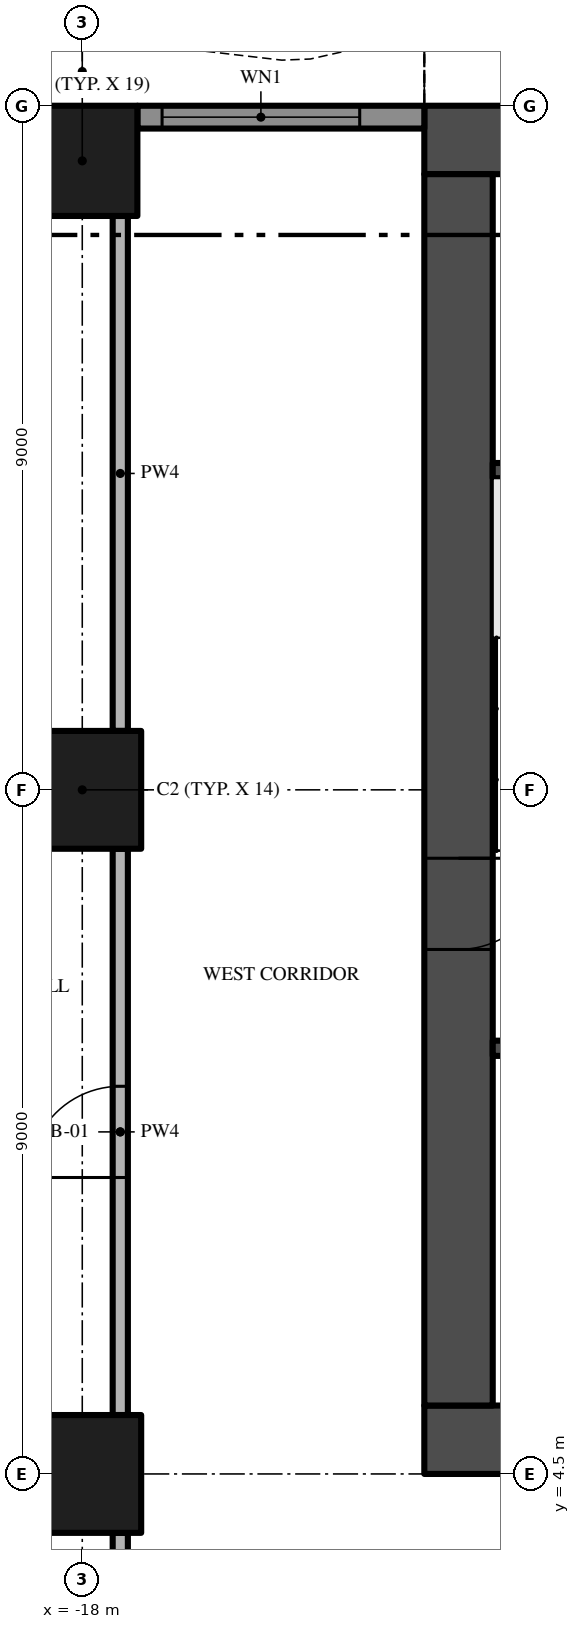
"""IFC4 building model, lengths in metres.
Left out: names, types, materials, properties, quantities, classifications, styles, units other than length and angle.
Written with IfcOpenShell. Run it as: python <this file> out.ifc"""

import sys

from ifc_helpers import new_model, si_unit, direction, frame, frame_2d, origin, origin_2d, place, context, subcontext, project, spatial, polyline, rectangle, outline, extrude, element, fill, save


model = new_model("IFC4")
c1 = context("Model", 3, precision=1e-05, world=origin(), true_north=direction((0.0, 1.0)))
c2 = subcontext(c1, "Body", "Model", "MODEL_VIEW")
j1 = project(units=[si_unit("LENGTHUNIT", "METRE"), si_unit("PLANEANGLEUNIT", "RADIAN")], contexts=[c1])
p1 = place(None, origin())
s1 = spatial("IfcSite", under=j1, at=p1, CompositionType="ELEMENT")
p2 = place(p1, origin())
s2 = spatial("IfcBuilding", under=s1, at=p2, CompositionType="ELEMENT")
p3 = place(p2, frame((0.0, 0.0, 34.0)))
s3 = spatial("IfcBuildingStorey", under=s2, at=p3, CompositionType="ELEMENT", Elevation=34.0)
p4 = place(p3, frame((-13.5, 4.95, -0.3), z_axis=(0.0, 0.0, 1.0), x_axis=(1.0, 0.0, 0.0)))
e1 = element("IfcWall", 1, at=p4, inside=s3, PredefinedType="SHEAR", context=c2, shape_type="SweptSolid", body=[
    extrude(rectangle(XDim=27.0, YDim=0.9, at=frame_2d((13.5, 0.0))), origin(), (0.0, 0.0, 1.0), 3.8),
])
p5 = place(p4, frame((12.0, 0.0, 0.3)))
e2 = element("IfcOpeningElement", 2, at=p5, cuts=e1, PredefinedType="OPENING", context=c2, shape_type="SweptSolid", body=[
    extrude(rectangle(XDim=3.0, YDim=2.4, at=frame_2d((1.5, 1.2))), frame((0.0, 0.46, 0.0), z_axis=(0.0, -1.0, 0.0), x_axis=(1.0, 0.0, 0.0)), (0.0, 0.0, 1.0), 0.92),
])
p6 = place(p4, frame((4.9, 0.0, 0.3)))
e3 = element("IfcOpeningElement", 3, at=p6, cuts=e1, PredefinedType="OPENING", context=c2, shape_type="SweptSolid", body=[
    extrude(rectangle(XDim=1.2, YDim=2.2, at=frame_2d((0.6, 1.1))), frame((0.0, 0.46, 0.0), z_axis=(0.0, -1.0, 0.0), x_axis=(1.0, 0.0, 0.0)), (0.0, 0.0, 1.0), 0.92),
])
p7 = place(p4, frame((20.75, 0.0, 0.3)))
e4 = element("IfcOpeningElement", 4, at=p7, cuts=e1, PredefinedType="OPENING", context=c2, shape_type="SweptSolid", body=[
    extrude(rectangle(XDim=1.5, YDim=2.2, at=frame_2d((0.75, 1.1))), frame((0.0, 0.46, 0.0), z_axis=(0.0, -1.0, 0.0), x_axis=(1.0, 0.0, 0.0)), (0.0, 0.0, 1.0), 0.92),
])
p8 = place(p4, frame((17.4, 0.0, 0.3)))
e5 = element("IfcOpeningElement", 5, at=p8, cuts=e1, PredefinedType="OPENING", context=c2, shape_type="SweptSolid", body=[
    extrude(rectangle(XDim=1.2, YDim=2.2, at=frame_2d((0.6, 1.1))), frame((0.0, 0.46, 0.0), z_axis=(0.0, -1.0, 0.0), x_axis=(1.0, 0.0, 0.0)), (0.0, 0.0, 1.0), 0.92),
])
p9 = place(p3, frame((13.5, 22.05, -0.3), z_axis=(0.0, 0.0, 1.0), x_axis=(-1.0, 0.0, 0.0)))
e6 = element("IfcWall", 6, at=p9, inside=s3, PredefinedType="SHEAR", context=c2, shape_type="SweptSolid", body=[
    extrude(rectangle(XDim=27.0, YDim=0.9, at=frame_2d((13.5, 0.0))), origin(), (0.0, 0.0, 1.0), 3.8),
])
p10 = place(p3, frame((-13.05, 21.6, -0.3), z_axis=(0.0, 0.0, 1.0), x_axis=(0.0, -1.0, 0.0)))
e7 = element("IfcWall", 7, at=p10, inside=s3, PredefinedType="SHEAR", context=c2, shape_type="SweptSolid", body=[
    extrude(rectangle(XDim=16.2, YDim=0.9, at=frame_2d((8.1, 0.0))), origin(), (0.0, 0.0, 1.0), 3.8),
])
p11 = place(p10, frame((9.0, 0.0, 0.3)))
e8 = element("IfcOpeningElement", 8, at=p11, cuts=e7, PredefinedType="OPENING", context=c2, shape_type="SweptSolid", body=[
    extrude(rectangle(XDim=1.2, YDim=2.2, at=frame_2d((0.6, 1.1))), frame((0.0, 0.46, 0.0), z_axis=(0.0, -1.0, 0.0), x_axis=(1.0, 0.0, 0.0)), (0.0, 0.0, 1.0), 0.92),
])
p12 = place(p3, frame((-18.0, 13.5, 0.0), z_axis=(0.0, 0.0, 1.0), x_axis=(1.0, 0.0, 0.0)))
e9 = element("IfcColumn", 9, at=p12, inside=s3, PredefinedType="COLUMN", context=c2, shape_type="SweptSolid", body=[
    extrude(rectangle(XDim=1.55, YDim=1.55, at=origin_2d()), origin(), (0.0, 0.0, 1.0), 3.5),
])
p13 = place(p3, frame((-18.0, 21.775, 0.0), z_axis=(0.0, 0.0, 1.0), x_axis=(1.0, 0.0, 0.0)))
e10 = element("IfcColumn", 10, at=p13, inside=s3, PredefinedType="COLUMN", context=c2, shape_type="SweptSolid", body=[
    extrude(rectangle(XDim=1.45, YDim=1.45, at=origin_2d()), origin(), (0.0, 0.0, 1.0), 3.5),
])
p14 = place(p3, frame((-18.0, 4.5, 0.0), z_axis=(0.0, 0.0, 1.0), x_axis=(1.0, 0.0, 0.0)))
e11 = element("IfcColumn", 11, at=p14, inside=s3, PredefinedType="COLUMN", context=c2, shape_type="SweptSolid", body=[
    extrude(rectangle(XDim=1.55, YDim=1.55, at=origin_2d()), origin(), (0.0, 0.0, 1.0), 3.5),
])
p15 = place(p3, frame((-17.275, 22.35, 0.0), z_axis=(0.0, 0.0, 1.0), x_axis=(1.0, 0.0, 0.0)))
e12 = element("IfcWall", 12, at=p15, inside=s3, PredefinedType="SOLIDWALL", context=c2, shape_type="SweptSolid", body=[
    extrude(rectangle(XDim=3.775, YDim=0.3, at=frame_2d((1.887, 0.0))), origin(), (0.0, 0.0, 1.0), 3.5),
])
p16 = place(p15, frame((0.325, 0.0, 0.45)))
e13 = element("IfcOpeningElement", 13, at=p16, cuts=e12, PredefinedType="OPENING", context=c2, shape_type="SweptSolid", body=[
    extrude(rectangle(XDim=2.6, YDim=2.65, at=frame_2d((1.3, 1.325))), frame((0.0, 0.16, 0.0), z_axis=(0.0, -1.0, 0.0), x_axis=(1.0, 0.0, 0.0)), (0.0, 0.0, 1.0), 0.32),
])
p17 = place(p3, origin())
e14 = element("IfcWall", 14, at=p17, inside=s3, PredefinedType="USERDEFINED", context=c2, shape_type="SweptSolid", body=[
    extrude(outline(polyline([(-13.5, 23.451), (-15.0, 23.115), (-15.375, 23.1), (-16.5, 23.231), (-18.0, 23.755), (-19.5, 24.488), (-21.0, 25.149), (-22.5, 25.485), (-22.555, 25.241), (-21.079, 24.91), (-19.605, 24.261), (-18.096, 23.524), (-16.556, 22.986), (-15.385, 22.849), (-14.967, 22.866), (-13.445, 23.208), (-13.5, 23.451)])), origin(), (0.0, 0.0, 1.0), 0.9),
])
for number, where, z_axis, x_axis in (
    (15, (-12.6, 10.1, 0.0), (0.0, 0.0, 1.0), (1.0, 0.0, 0.0)),
    (16, (-12.6, 17.7, 0.0), (0.0, 0.0, 1.0), (1.0, 0.0, 0.0)),
):
    element("IfcWall", number, at=place(p3, frame(where, z_axis=z_axis, x_axis=x_axis)), inside=s3, PredefinedType="SHEAR", context=c2, shape_type="SweptSolid", body=[
        extrude(rectangle(XDim=2.95, YDim=0.2, at=frame_2d((1.475, 0.0))), origin(), (0.0, 0.0, 1.0), 3.5),
    ])
p18 = place(p3, frame((-17.5, -0.2, 0.0), z_axis=(0.0, 0.0, 1.0), x_axis=(0.0, 1.0, 0.0)))
e17 = element("IfcWall", 17, at=p18, inside=s3, PredefinedType="PARTITIONING", context=c2, shape_type="SweptSolid", body=[
    extrude(rectangle(XDim=3.925, YDim=0.2, at=frame_2d((1.962, 0.0))), origin(), (0.0, 0.0, 1.0), 3.5),
])
p19 = place(p3, frame((-17.5, 5.275, 0.0), z_axis=(0.0, 0.0, 1.0), x_axis=(0.0, 1.0, 0.0)))
e18 = element("IfcWall", 18, at=p19, inside=s3, PredefinedType="PARTITIONING", context=c2, shape_type="SweptSolid", body=[
    extrude(rectangle(XDim=7.45, YDim=0.2, at=frame_2d((3.725, 0.0))), origin(), (0.0, 0.0, 1.0), 3.5),
])
p20 = place(p19, frame((3.125, 0.0, 0.0)))
e19 = element("IfcOpeningElement", 19, at=p20, cuts=e18, PredefinedType="OPENING", context=c2, shape_type="SweptSolid", body=[
    extrude(rectangle(XDim=1.2, YDim=2.4, at=frame_2d((0.6, 1.2))), frame((0.0, 0.11, 0.0), z_axis=(0.0, -1.0, 0.0), x_axis=(1.0, 0.0, 0.0)), (0.0, 0.0, 1.0), 0.22),
])
p21 = place(p3, frame((-17.5, 14.275, 0.0), z_axis=(0.0, 0.0, 1.0), x_axis=(0.0, 1.0, 0.0)))
e20 = element("IfcWall", 20, at=p21, inside=s3, PredefinedType="PARTITIONING", context=c2, shape_type="SweptSolid", body=[
    extrude(rectangle(XDim=6.775, YDim=0.2, at=frame_2d((3.388, 0.0))), origin(), (0.0, 0.0, 1.0), 3.5),
])
p22 = place(p16, origin())
e21 = element("IfcWindow", 21, at=p22, inside=s3, PartitioningType="SINGLE_PANEL", PredefinedType="WINDOW", context=c2, shape_type="SweptSolid", body=[
    extrude(rectangle(XDim=2.6, YDim=2.65, at=frame_2d((1.3, 1.325))), frame((0.0, 0.03, 0.0), z_axis=(0.0, -1.0, 0.0), x_axis=(1.0, 0.0, 0.0)), (0.0, 0.0, 1.0), 0.06),
])
fill(e13, e21)
p23 = place(p11, frame((1.2, 0.0, 0.0), z_axis=(0.0, 0.0, 1.0), x_axis=(-1.0, 0.0, 0.0)))
e22 = element("IfcDoor", 22, at=p23, inside=s3, OperationType="SINGLE_SWING_RIGHT", PredefinedType="DOOR", context=c2, shape_type="SweptSolid", body=[
    extrude(rectangle(XDim=1.2, YDim=2.2, at=frame_2d((0.6, 1.1))), frame((0.0, 0.025, 0.0), z_axis=(0.0, -1.0, 0.0), x_axis=(1.0, 0.0, 0.0)), (0.0, 0.0, 1.0), 0.05),
])
fill(e8, e22)
p24 = place(p20, origin())
e23 = element("IfcDoor", 23, at=p24, inside=s3, OperationType="SINGLE_SWING_LEFT", PredefinedType="DOOR", context=c2, shape_type="SweptSolid", body=[
    extrude(rectangle(XDim=1.2, YDim=2.4, at=frame_2d((0.6, 1.2))), frame((0.0, 0.025, 0.0), z_axis=(0.0, -1.0, 0.0), x_axis=(1.0, 0.0, 0.0)), (0.0, 0.0, 1.0), 0.05),
])
fill(e19, e23)
save(model, sys.argv[1])
